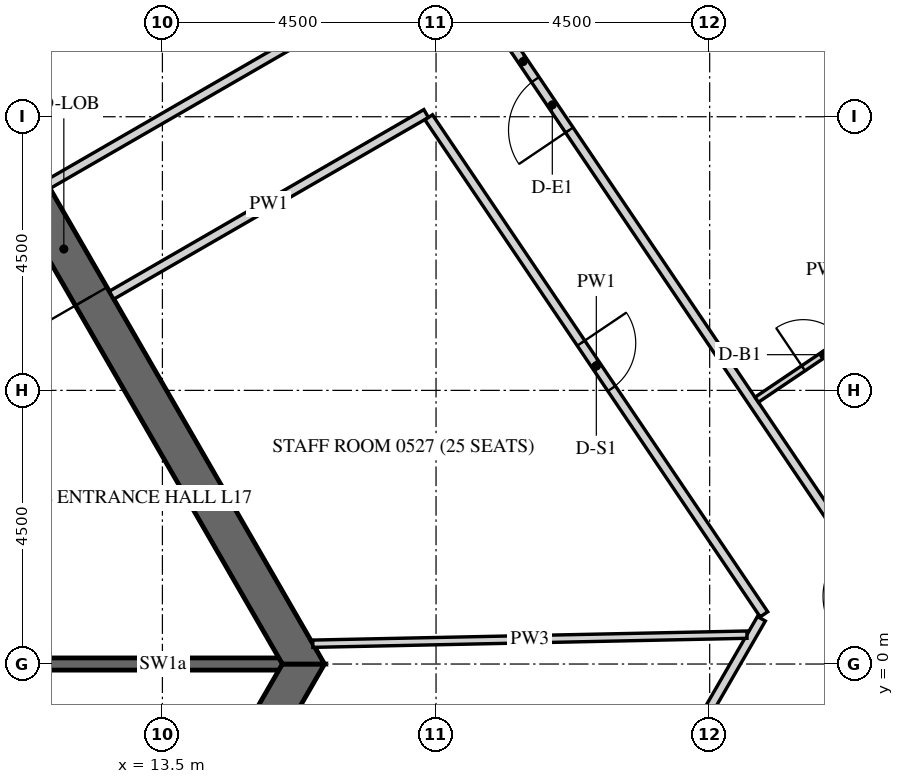
"""IFC4 building model, lengths in metres.
Left out: names, types, materials, properties, quantities, classifications, styles, units other than length and angle.
Written with IfcOpenShell. Run it as: python <this file> out.ifc"""

import sys

from ifc_helpers import new_model, si_unit, direction, frame, frame_2d, origin, place, context, subcontext, project, spatial, polyline, rectangle, outline, extrude, element, fill, save


model = new_model("IFC4")
c1 = context("Model", 3, precision=1e-05, world=origin(), true_north=direction((0.0, 1.0)))
c2 = subcontext(c1, "Body", "Model", "MODEL_VIEW")
j1 = project(units=[si_unit("LENGTHUNIT", "METRE"), si_unit("PLANEANGLEUNIT", "RADIAN")], contexts=[c1])
p1 = place(None, origin())
s1 = spatial("IfcSite", under=j1, at=p1, CompositionType="ELEMENT")
p2 = place(p1, origin())
s2 = spatial("IfcBuilding", under=s1, at=p2, CompositionType="ELEMENT")
p3 = place(p2, frame((0.0, 0.0, 80.4)))
s3 = spatial("IfcBuildingStorey", under=s2, at=p3, CompositionType="ELEMENT", Elevation=80.4)
p4 = place(p3, frame((33.728, 3.153, -0.15), z_axis=(0.0, 0.0, 1.0), x_axis=(-0.559192411416, 0.82903790445, 0.0)))
e1 = element("IfcWall", 1, at=p4, inside=s3, PredefinedType="SOLIDWALL", context=c2, shape_type="SweptSolid", body=[
    extrude(outline(polyline([(-0.026, -0.275), (30.093, -0.275), (30.048, 0.275), (0.026, 0.275), (-0.026, -0.275)])), origin(), (0.0, 0.0, 1.0), 3.9),
])
p5 = place(p4, frame((1.236, 0.0, 1.05)))
e2 = element("IfcOpeningElement", 2, at=p5, cuts=e1, PredefinedType="OPENING", context=c2, shape_type="SweptSolid", body=[
    extrude(rectangle(XDim=2.4, YDim=2.4, at=frame_2d((1.2, 1.2))), frame((0.0, 0.285, 0.0), z_axis=(0.0, -1.0, 0.0), x_axis=(1.0, 0.0, 0.0)), (0.0, 0.0, 1.0), 0.57),
])
p6 = place(p4, frame((4.835, 0.0, 1.05)))
e3 = element("IfcOpeningElement", 3, at=p6, cuts=e1, PredefinedType="OPENING", context=c2, shape_type="SweptSolid", body=[
    extrude(rectangle(XDim=2.4, YDim=2.4, at=frame_2d((1.2, 1.2))), frame((0.0, 0.285, 0.0), z_axis=(0.0, -1.0, 0.0), x_axis=(1.0, 0.0, 0.0)), (0.0, 0.0, 1.0), 0.57),
])
p7 = place(p4, frame((8.436, 0.0, 1.05)))
e4 = element("IfcOpeningElement", 4, at=p7, cuts=e1, PredefinedType="OPENING", context=c2, shape_type="SweptSolid", body=[
    extrude(rectangle(XDim=2.4, YDim=2.4, at=frame_2d((1.2, 1.2))), frame((0.0, 0.285, 0.0), z_axis=(0.0, -1.0, 0.0), x_axis=(1.0, 0.0, 0.0)), (0.0, 0.0, 1.0), 0.57),
])
p8 = place(p4, frame((12.035, 0.0, 1.05)))
e5 = element("IfcOpeningElement", 5, at=p8, cuts=e1, PredefinedType="OPENING", context=c2, shape_type="SweptSolid", body=[
    extrude(rectangle(XDim=2.4, YDim=2.4, at=frame_2d((1.2, 1.2))), frame((0.0, 0.285, 0.0), z_axis=(0.0, -1.0, 0.0), x_axis=(1.0, 0.0, 0.0)), (0.0, 0.0, 1.0), 0.57),
])
p9 = place(p4, frame((15.635, 0.0, 1.05)))
e6 = element("IfcOpeningElement", 6, at=p9, cuts=e1, PredefinedType="OPENING", context=c2, shape_type="SweptSolid", body=[
    extrude(rectangle(XDim=2.4, YDim=2.4, at=frame_2d((1.2, 1.2))), frame((0.0, 0.285, 0.0), z_axis=(0.0, -1.0, 0.0), x_axis=(1.0, 0.0, 0.0)), (0.0, 0.0, 1.0), 0.57),
])
p10 = place(p4, frame((19.236, 0.0, 1.05)))
e7 = element("IfcOpeningElement", 7, at=p10, cuts=e1, PredefinedType="OPENING", context=c2, shape_type="SweptSolid", body=[
    extrude(rectangle(XDim=2.4, YDim=2.4, at=frame_2d((1.2, 1.2))), frame((0.0, 0.285, 0.0), z_axis=(0.0, -1.0, 0.0), x_axis=(1.0, 0.0, 0.0)), (0.0, 0.0, 1.0), 0.57),
])
p11 = place(p4, frame((22.835, 0.0, 1.05)))
e8 = element("IfcOpeningElement", 8, at=p11, cuts=e1, PredefinedType="OPENING", context=c2, shape_type="SweptSolid", body=[
    extrude(rectangle(XDim=2.4, YDim=2.4, at=frame_2d((1.2, 1.2))), frame((0.0, 0.285, 0.0), z_axis=(0.0, -1.0, 0.0), x_axis=(1.0, 0.0, 0.0)), (0.0, 0.0, 1.0), 0.57),
])
p12 = place(p4, frame((26.436, 0.0, 1.05)))
e9 = element("IfcOpeningElement", 9, at=p12, cuts=e1, PredefinedType="OPENING", context=c2, shape_type="SweptSolid", body=[
    extrude(rectangle(XDim=2.4, YDim=2.4, at=frame_2d((1.2, 1.2))), frame((0.0, 0.285, 0.0), z_axis=(0.0, -1.0, 0.0), x_axis=(1.0, 0.0, 0.0)), (0.0, 0.0, 1.0), 0.57),
])
p13 = place(p3, frame((7.91, -13.7, -0.15), z_axis=(0.0, 0.0, 1.0), x_axis=(0.499999880136, 0.866025472988, 0.0)))
e10 = element("IfcWall", 10, at=p13, inside=s3, PredefinedType="SHEAR", context=c2, shape_type="SweptSolid", body=[
    extrude(outline(polyline([(-0.173, -0.3), (15.993, -0.3), (15.646, 0.3), (0.173, 0.3), (-0.173, -0.3)])), origin(), (0.0, 0.0, 1.0), 3.9),
])
p14 = place(p13, frame((7.039, 0.0, 0.15)))
e11 = element("IfcOpeningElement", 11, at=p14, cuts=e10, PredefinedType="OPENING", context=c2, shape_type="SweptSolid", body=[
    extrude(rectangle(XDim=1.8, YDim=2.4, at=frame_2d((0.9, 1.2))), frame((0.0, 0.31, 0.0), z_axis=(0.0, -1.0, 0.0), x_axis=(1.0, 0.0, 0.0)), (0.0, 0.0, 1.0), 0.62),
])
p15 = place(p3, frame((15.819, 0.0, -0.15), z_axis=(0.0, 0.0, 1.0), x_axis=(-0.499999880136, 0.866025472988, 0.0)))
e12 = element("IfcWall", 12, at=p15, inside=s3, PredefinedType="SHEAR", context=c2, shape_type="SweptSolid", body=[
    extrude(outline(polyline([(-0.173, -0.3), (15.993, -0.3), (15.646, 0.3), (0.173, 0.3), (-0.173, -0.3)])), origin(), (0.0, 0.0, 1.0), 3.9),
])
p16 = place(p15, frame((6.981, 0.0, 0.15)))
e13 = element("IfcOpeningElement", 13, at=p16, cuts=e12, PredefinedType="OPENING", context=c2, shape_type="SweptSolid", body=[
    extrude(rectangle(XDim=1.8, YDim=2.4, at=frame_2d((0.9, 1.2))), frame((0.0, 0.31, 0.0), z_axis=(0.0, -1.0, 0.0), x_axis=(1.0, 0.0, 0.0)), (0.0, 0.0, 1.0), 0.62),
])
p17 = place(p3, frame((11.547, 0.0, -0.15), z_axis=(0.0, 0.0, 1.0), x_axis=(1.0, 0.0, 0.0)))
e14 = element("IfcWall", 14, at=p17, inside=s3, PredefinedType="SHEAR", context=c2, shape_type="SweptSolid", body=[
    extrude(rectangle(XDim=3.926, YDim=0.2, at=frame_2d((1.963, 0.0))), origin(), (0.0, 0.0, 1.0), 3.9),
])
p18 = place(p3, frame((13.755, -19.475, 0.0), z_axis=(0.0, 0.0, 1.0), x_axis=(0.50000013933, 0.866025323342, 0.0)))
e15 = element("IfcWall", 15, at=p18, inside=s3, PredefinedType="PARTITIONING", context=c2, shape_type="SweptSolid", body=[
    extrude(rectangle(XDim=23.517, YDim=0.15, at=frame_2d((11.758, 0.0))), origin(), (0.0, 0.0, 1.0), 2.988),
])
p19 = place(p18, frame((2.056, 0.0, 0.0)))
e16 = element("IfcOpeningElement", 16, at=p19, cuts=e15, PredefinedType="OPENING", context=c2, shape_type="SweptSolid", body=[
    extrude(rectangle(XDim=1.0, YDim=2.1, at=frame_2d((0.5, 1.05))), frame((0.0, 0.085, 0.0), z_axis=(0.0, -1.0, 0.0), x_axis=(1.0, 0.0, 0.0)), (0.0, 0.0, 1.0), 0.17),
])
p20 = place(p18, frame((15.499, 0.0, 0.0)))
e17 = element("IfcOpeningElement", 17, at=p20, cuts=e15, PredefinedType="OPENING", context=c2, shape_type="SweptSolid", body=[
    extrude(rectangle(XDim=1.0, YDim=2.1, at=frame_2d((0.5, 1.05))), frame((0.0, 0.085, 0.0), z_axis=(0.0, -1.0, 0.0), x_axis=(1.0, 0.0, 0.0)), (0.0, 0.0, 1.0), 0.17),
])
p21 = place(p3, frame((25.467, 0.96, 0.0), z_axis=(0.0, 0.0, 1.0), x_axis=(-0.559192112521, 0.829038106057, 0.0)))
e18 = element("IfcWall", 18, at=p21, inside=s3, PredefinedType="PARTITIONING", context=c2, shape_type="SweptSolid", body=[
    extrude(rectangle(XDim=21.584, YDim=0.15, at=frame_2d((10.792, 0.0))), origin(), (0.0, 0.0, 1.0), 2.988),
])
p22 = place(p21, frame((0.184, 0.0, 0.0)))
e19 = element("IfcOpeningElement", 19, at=p22, cuts=e18, PredefinedType="OPENING", context=c2, shape_type="SweptSolid", body=[
    extrude(rectangle(XDim=1.0, YDim=2.1, at=frame_2d((0.5, 1.05))), frame((0.0, 0.085, 0.0), z_axis=(0.0, -1.0, 0.0), x_axis=(1.0, 0.0, 0.0)), (0.0, 0.0, 1.0), 0.17),
])
p23 = place(p21, frame((9.434, 0.0, 0.0)))
e20 = element("IfcOpeningElement", 20, at=p23, cuts=e18, PredefinedType="OPENING", context=c2, shape_type="SweptSolid", body=[
    extrude(rectangle(XDim=1.0, YDim=2.1, at=frame_2d((0.5, 1.05))), frame((0.0, 0.085, 0.0), z_axis=(0.0, -1.0, 0.0), x_axis=(1.0, 0.0, 0.0)), (0.0, 0.0, 1.0), 0.17),
])
p24 = place(p21, frame((16.951, 0.0, 0.0)))
e21 = element("IfcOpeningElement", 21, at=p24, cuts=e18, PredefinedType="OPENING", context=c2, shape_type="SweptSolid", body=[
    extrude(rectangle(XDim=1.0, YDim=2.1, at=frame_2d((0.5, 1.05))), frame((0.0, 0.085, 0.0), z_axis=(0.0, -1.0, 0.0), x_axis=(1.0, 0.0, 0.0)), (0.0, 0.0, 1.0), 0.17),
])
p25 = place(p3, frame((23.351, 0.745, 0.0), z_axis=(0.0, 0.0, 1.0), x_axis=(-0.49999316964, -0.866029347258, 0.0)))
e22 = element("IfcWall", 22, at=p25, inside=s3, PredefinedType="PARTITIONING", context=c2, shape_type="SweptSolid", body=[
    extrude(rectangle(XDim=11.241, YDim=0.15, at=frame_2d((5.621, 0.0))), origin(), (0.0, 0.0, 1.0), 2.988),
])
p26 = place(p25, frame((5.171, 0.0, 0.0)))
e23 = element("IfcOpeningElement", 23, at=p26, cuts=e22, PredefinedType="OPENING", context=c2, shape_type="SweptSolid", body=[
    extrude(rectangle(XDim=0.9, YDim=2.1, at=frame_2d((0.45, 1.05))), frame((0.0, 0.085, 0.0), z_axis=(0.0, -1.0, 0.0), x_axis=(1.0, 0.0, 0.0)), (0.0, 0.0, 1.0), 0.17),
])
p27 = place(p3, frame((12.664, 6.066, 0.0), z_axis=(0.0, 0.0, 1.0), x_axis=(0.866018848283, 0.500011354289, 0.0)))
e24 = element("IfcWall", 24, at=p27, inside=s3, PredefinedType="PARTITIONING", context=c2, shape_type="SweptSolid", body=[
    extrude(rectangle(XDim=5.974, YDim=0.15, at=frame_2d((2.987, 0.0))), origin(), (0.0, 0.0, 1.0), 2.988),
])
p28 = place(p3, frame((17.879, 8.99, 0.0), z_axis=(0.0, 0.0, 1.0), x_axis=(0.559189565351, -0.829039824136, 0.0)))
e25 = element("IfcWall", 25, at=p28, inside=s3, PredefinedType="PARTITIONING", context=c2, shape_type="SweptSolid", body=[
    extrude(rectangle(XDim=9.859, YDim=0.15, at=frame_2d((4.929, 0.0))), origin(), (0.0, 0.0, 1.0), 2.988),
])
p29 = place(p28, frame((4.479, 0.0, 0.0)))
e26 = element("IfcOpeningElement", 26, at=p29, cuts=e25, PredefinedType="OPENING", context=c2, shape_type="SweptSolid", body=[
    extrude(rectangle(XDim=0.9, YDim=2.1, at=frame_2d((0.45, 1.05))), frame((0.0, 0.085, 0.0), z_axis=(0.0, -1.0, 0.0), x_axis=(1.0, 0.0, 0.0)), (0.0, 0.0, 1.0), 0.17),
])
p30 = place(p3, frame((16.595, 10.76, 0.0), z_axis=(0.0, 0.0, 1.0), x_axis=(-0.866019477104, -0.500010265171, 0.0)))
e27 = element("IfcWall", 27, at=p30, inside=s3, PredefinedType="PARTITIONING", context=c2, shape_type="SweptSolid", body=[
    extrude(rectangle(XDim=5.752, YDim=0.15, at=frame_2d((2.876, 0.0))), origin(), (0.0, 0.0, 1.0), 2.988),
])
p31 = place(p3, frame((23.273, 4.346, 0.0), z_axis=(0.0, 0.0, 1.0), x_axis=(0.829005477618, 0.559240483226, 0.0)))
e28 = element("IfcWall", 28, at=p31, inside=s3, PredefinedType="PARTITIONING", context=c2, shape_type="SweptSolid", body=[
    extrude(rectangle(XDim=2.725, YDim=0.1, at=frame_2d((1.363, 0.0))), origin(), (0.0, 0.0, 1.0), 2.988),
])
p32 = place(p31, frame((0.925, 0.0, 0.0)))
e29 = element("IfcOpeningElement", 29, at=p32, cuts=e28, PredefinedType="OPENING", context=c2, shape_type="SweptSolid", body=[
    extrude(rectangle(XDim=0.8, YDim=2.1, at=frame_2d((0.4, 1.05))), frame((0.0, 0.06, 0.0), z_axis=(0.0, -1.0, 0.0), x_axis=(1.0, 0.0, 0.0)), (0.0, 0.0, 1.0), 0.12),
])
p33 = place(p3, frame((23.113, 0.483, 0.0), z_axis=(0.0, 0.0, 1.0), x_axis=(-0.999781109464, -0.020922073482, 0.0)))
e30 = element("IfcWall", 30, at=p33, inside=s3, PredefinedType="PARTITIONING", context=c2, shape_type="SweptSolid", body=[
    extrude(rectangle(XDim=7.141, YDim=0.12, at=frame_2d((3.571, 0.0))), origin(), (0.0, 0.0, 1.0), 2.988),
])
p34 = place(p16, origin())
e31 = element("IfcDoor", 31, at=p34, inside=s3, OperationType="DOUBLE_DOOR_SINGLE_SWING", PredefinedType="DOOR", context=c2, shape_type="SweptSolid", body=[
    extrude(rectangle(XDim=1.8, YDim=2.4, at=frame_2d((0.9, 1.2))), frame((0.0, 0.025, 0.0), z_axis=(0.0, -1.0, 0.0), x_axis=(1.0, 0.0, 0.0)), (0.0, 0.0, 1.0), 0.05),
])
fill(e13, e31)
p35 = place(p23, origin())
e32 = element("IfcDoor", 32, at=p35, inside=s3, OperationType="SINGLE_SWING_LEFT", PredefinedType="DOOR", context=c2, shape_type="SweptSolid", body=[
    extrude(rectangle(XDim=1.0, YDim=2.1, at=frame_2d((0.5, 1.05))), frame((0.0, 0.025, 0.0), z_axis=(0.0, -1.0, 0.0), x_axis=(1.0, 0.0, 0.0)), (0.0, 0.0, 1.0), 0.05),
])
fill(e20, e32)
p36 = place(p32, origin())
e33 = element("IfcDoor", 33, at=p36, inside=s3, OperationType="SINGLE_SWING_RIGHT", PredefinedType="DOOR", context=c2, shape_type="SweptSolid", body=[
    extrude(rectangle(XDim=0.8, YDim=2.1, at=frame_2d((0.4, 1.05))), frame((0.0, 0.025, 0.0), z_axis=(0.0, -1.0, 0.0), x_axis=(1.0, 0.0, 0.0)), (0.0, 0.0, 1.0), 0.05),
])
fill(e29, e33)
p37 = place(p29, origin())
e34 = element("IfcDoor", 34, at=p37, inside=s3, OperationType="SINGLE_SWING_RIGHT", PredefinedType="DOOR", context=c2, shape_type="SweptSolid", body=[
    extrude(rectangle(XDim=0.9, YDim=2.1, at=frame_2d((0.45, 1.05))), frame((0.0, 0.025, 0.0), z_axis=(0.0, -1.0, 0.0), x_axis=(1.0, 0.0, 0.0)), (0.0, 0.0, 1.0), 0.05),
])
fill(e26, e34)
save(model, sys.argv[1])
